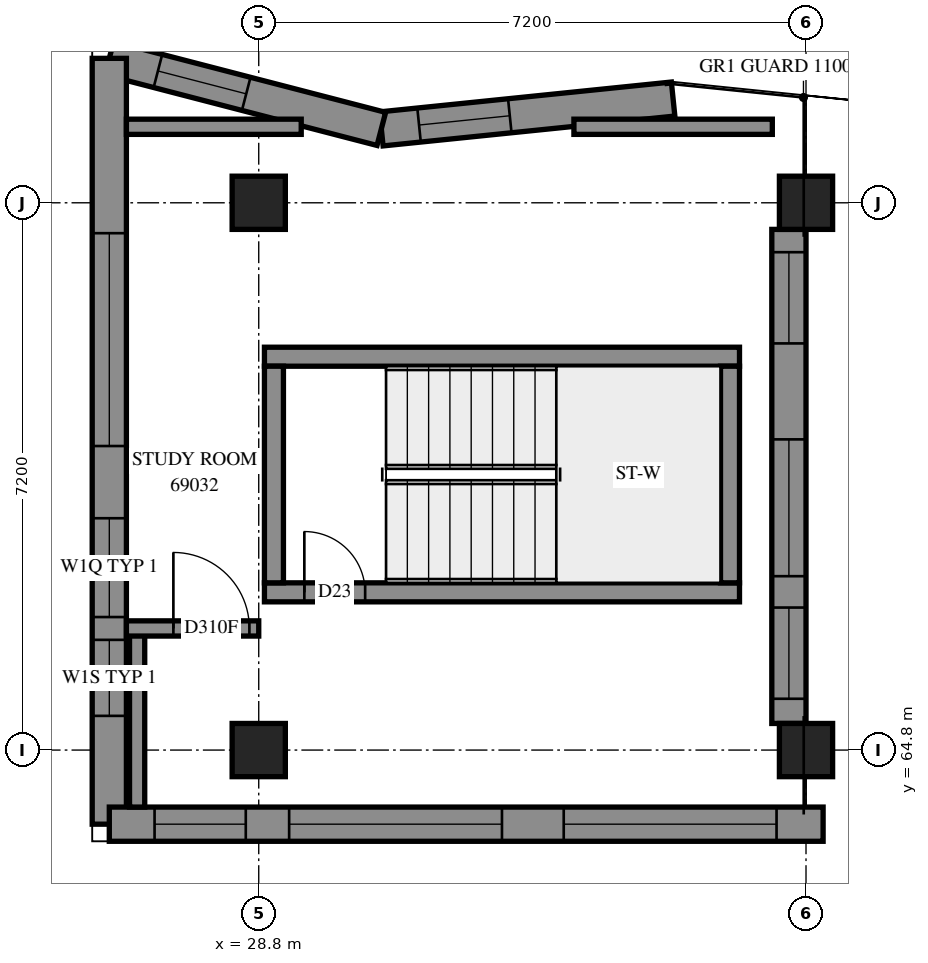
"""IFC4 building model, lengths in metres.
Left out: names, types, materials, properties, quantities, classifications, styles, units other than length and angle.
Written with IfcOpenShell. Run it as: python <this file> out.ifc"""

import sys

from ifc_helpers import new_model, si_unit, direction, frame, frame_2d, origin, origin_2d, place, context, subcontext, project, spatial, polyline, rectangle, outline, extrude, element, fill, save


model = new_model("IFC4")
c1 = context("Model", 3, precision=1e-05, world=origin(), true_north=direction((0.0, 1.0)))
c2 = subcontext(c1, "Body", "Model", "MODEL_VIEW")
j1 = project(units=[si_unit("LENGTHUNIT", "METRE"), si_unit("PLANEANGLEUNIT", "RADIAN")], contexts=[c1])
p1 = place(None, origin())
s1 = spatial("IfcSite", under=j1, at=p1, CompositionType="ELEMENT")
p2 = place(p1, origin())
s2 = spatial("IfcBuilding", under=s1, at=p2, CompositionType="ELEMENT")
p3 = place(p2, frame((0.0, 0.0, 254.0)))
s3 = spatial("IfcBuildingStorey", under=s2, at=p3, CompositionType="ELEMENT", Elevation=254.0)
for number, where, z_axis, x_axis in (
    (1, (28.8, 64.8, 0.0), (0.0, 0.0, 1.0), (1.0, 0.0, 0.0)),
    (2, (28.8, 72.0, 0.0), (0.0, 0.0, 1.0), (1.0, 0.0, 0.0)),
    (3, (36.0, 64.8, 0.0), (0.0, 0.0, 1.0), (1.0, 0.0, 0.0)),
    (4, (36.0, 72.0, 0.0), (0.0, 0.0, 1.0), (1.0, 0.0, 0.0)),
):
    element("IfcColumn", number, at=place(p3, frame(where, z_axis=z_axis, x_axis=x_axis)), inside=s3, PredefinedType="COLUMN", context=c2, shape_type="SweptSolid", body=[
        extrude(rectangle(XDim=0.7, YDim=0.7, at=origin_2d()), origin(), (0.0, 0.0, 1.0), 3.1),
    ])
p4 = place(p3, frame((34.252, 73.365, 0.0), z_axis=(0.0, 0.0, 1.0), x_axis=(-0.994808045, -0.1017691196, 0.0)))
e5 = element("IfcWall", 5, at=p4, inside=s3, PredefinedType="SOLIDWALL", context=c2, shape_type="SweptSolid", body=[
    extrude(outline(polyline([(-0.023, -0.225), (3.818, -0.225), (3.899, 0.225), (0.023, 0.225), (-0.023, -0.225)])), origin(), (0.0, 0.0, 1.0), 3.1),
])
p5 = place(p4, frame((2.16, 0.0, 0.45)))
e6 = element("IfcOpeningElement", 6, at=p5, cuts=e5, PredefinedType="OPENING", context=c2, shape_type="SweptSolid", body=[
    extrude(rectangle(XDim=1.2, YDim=2.55, at=frame_2d((0.6, 1.275))), frame((0.0, 0.235, 0.0), z_axis=(0.0, -1.0, 0.0), x_axis=(1.0, 0.0, 0.0)), (0.0, 0.0, 1.0), 0.47),
])
p6 = place(p3, frame((30.413, 72.972, 0.0), z_axis=(0.0, 0.0, 1.0), x_axis=(-0.967983026, 0.2510156598, 0.0)))
e7 = element("IfcWall", 7, at=p6, inside=s3, PredefinedType="SOLIDWALL", context=c2, shape_type="SweptSolid", body=[
    extrude(outline(polyline([(0.04, -0.225), (3.988, -0.225), (3.407, 0.225), (-0.04, 0.225), (0.04, -0.225)])), origin(), (0.0, 0.0, 1.0), 3.1),
])
p7 = place(p6, frame((1.837, 0.0, 0.45)))
e8 = element("IfcOpeningElement", 8, at=p7, cuts=e7, PredefinedType="OPENING", context=c2, shape_type="SweptSolid", body=[
    extrude(rectangle(XDim=1.2, YDim=2.55, at=frame_2d((0.6, 1.275))), frame((0.0, 0.235, 0.0), z_axis=(0.0, -1.0, 0.0), x_axis=(1.0, 0.0, 0.0)), (0.0, 0.0, 1.0), 0.47),
])
p8 = place(p3, frame((26.834, 73.9, 0.0), z_axis=(0.0, 0.0, 1.0), x_axis=(0.0, -1.0, 0.0)))
e9 = element("IfcWall", 9, at=p8, inside=s3, PredefinedType="SOLIDWALL", context=c2, shape_type="SweptSolid", body=[
    extrude(outline(polyline([(-0.291, -0.225), (10.3, -0.225), (9.85, 0.225), (0.291, 0.225), (-0.291, -0.225)])), origin(), (0.0, 0.0, 1.0), 3.1),
])
p9 = place(p8, frame((2.3, 0.0, 0.45)))
e10 = element("IfcOpeningElement", 10, at=p9, cuts=e9, PredefinedType="OPENING", context=c2, shape_type="SweptSolid", body=[
    extrude(rectangle(XDim=2.8, YDim=2.55, at=frame_2d((1.4, 1.275))), frame((0.0, 0.235, 0.0), z_axis=(0.0, -1.0, 0.0), x_axis=(1.0, 0.0, 0.0)), (0.0, 0.0, 1.0), 0.47),
])
p10 = place(p8, frame((6.05, 0.0, 0.45)))
e11 = element("IfcOpeningElement", 11, at=p10, cuts=e9, PredefinedType="OPENING", context=c2, shape_type="SweptSolid", body=[
    extrude(rectangle(XDim=1.3, YDim=2.5, at=frame_2d((0.65, 1.25))), frame((0.0, 0.235, 0.0), z_axis=(0.0, -1.0, 0.0), x_axis=(1.0, 0.0, 0.0)), (0.0, 0.0, 1.0), 0.47),
])
p11 = place(p8, frame((7.65, 0.0, 0.45)))
e12 = element("IfcOpeningElement", 12, at=p11, cuts=e9, PredefinedType="OPENING", context=c2, shape_type="SweptSolid", body=[
    extrude(rectangle(XDim=1.0, YDim=2.5, at=frame_2d((0.5, 1.25))), frame((0.0, 0.235, 0.0), z_axis=(0.0, -1.0, 0.0), x_axis=(1.0, 0.0, 0.0)), (0.0, 0.0, 1.0), 0.47),
])
p12 = place(p3, frame((26.834, 63.825, 0.0), z_axis=(0.0, 0.0, 1.0), x_axis=(1.0, 0.0, 0.0)))
e13 = element("IfcWall", 13, at=p12, inside=s3, PredefinedType="SOLIDWALL", context=c2, shape_type="SweptSolid", body=[
    extrude(outline(polyline([(-0.225, -0.225), (9.166, -0.225), (9.616, 0.225), (0.225, 0.225), (-0.225, -0.225)])), origin(), (0.0, 0.0, 1.0), 3.1),
])
p13 = place(p12, frame((2.366, 0.0, 0.45)))
e14 = element("IfcOpeningElement", 14, at=p13, cuts=e13, PredefinedType="OPENING", context=c2, shape_type="SweptSolid", body=[
    extrude(rectangle(XDim=2.8, YDim=2.55, at=frame_2d((1.4, 1.275))), frame((0.0, 0.235, 0.0), z_axis=(0.0, -1.0, 0.0), x_axis=(1.0, 0.0, 0.0)), (0.0, 0.0, 1.0), 0.47),
])
p14 = place(p12, frame((5.979, 0.0, 0.45)))
e15 = element("IfcOpeningElement", 15, at=p14, cuts=e13, PredefinedType="OPENING", context=c2, shape_type="SweptSolid", body=[
    extrude(rectangle(XDim=2.8, YDim=2.55, at=frame_2d((1.4, 1.275))), frame((0.0, 0.235, 0.0), z_axis=(0.0, -1.0, 0.0), x_axis=(1.0, 0.0, 0.0)), (0.0, 0.0, 1.0), 0.47),
])
p15 = place(p12, frame((0.596, 0.0, 0.45)))
e16 = element("IfcOpeningElement", 16, at=p15, cuts=e13, PredefinedType="OPENING", context=c2, shape_type="SweptSolid", body=[
    extrude(rectangle(XDim=1.2, YDim=2.55, at=frame_2d((0.6, 1.275))), frame((0.0, 0.235, 0.0), z_axis=(0.0, -1.0, 0.0), x_axis=(1.0, 0.0, 0.0)), (0.0, 0.0, 1.0), 0.47),
])
p16 = place(p3, frame((35.775, 65.15, 0.0), z_axis=(0.0, 0.0, 1.0), x_axis=(0.0, 1.0, 0.0)))
e17 = element("IfcWall", 17, at=p16, inside=s3, PredefinedType="SOLIDWALL", context=c2, shape_type="SweptSolid", body=[
    extrude(rectangle(XDim=6.5, YDim=0.45, at=frame_2d((3.25, 0.0))), origin(), (0.0, 0.0, 1.0), 3.1),
])
p17 = place(p16, frame((0.325, 0.0, 0.6)))
e18 = element("IfcOpeningElement", 18, at=p17, cuts=e17, PredefinedType="OPENING", context=c2, shape_type="SweptSolid", body=[
    extrude(rectangle(XDim=1.2, YDim=1.9, at=frame_2d((0.6, 0.95))), frame((0.0, 0.235, 0.0), z_axis=(0.0, -1.0, 0.0), x_axis=(1.0, 0.0, 0.0)), (0.0, 0.0, 1.0), 0.47),
])
p18 = place(p16, frame((1.938, 0.0, 0.7)))
e19 = element("IfcOpeningElement", 19, at=p18, cuts=e17, PredefinedType="OPENING", context=c2, shape_type="SweptSolid", body=[
    extrude(rectangle(XDim=1.8, YDim=1.8, at=frame_2d((0.9, 0.9))), frame((0.0, 0.235, 0.0), z_axis=(0.0, -1.0, 0.0), x_axis=(1.0, 0.0, 0.0)), (0.0, 0.0, 1.0), 0.47),
])
p19 = place(p16, frame((5.0, 0.0, 0.6)))
e20 = element("IfcOpeningElement", 20, at=p19, cuts=e17, PredefinedType="OPENING", context=c2, shape_type="SweptSolid", body=[
    extrude(rectangle(XDim=1.2, YDim=1.9, at=frame_2d((0.6, 0.95))), frame((0.0, 0.235, 0.0), z_axis=(0.0, -1.0, 0.0), x_axis=(1.0, 0.0, 0.0)), (0.0, 0.0, 1.0), 0.47),
])
p20 = place(p3, frame((28.875, 66.875, -0.3), z_axis=(0.0, 0.0, 1.0), x_axis=(1.0, 0.0, 0.0)))
e21 = element("IfcWall", 21, at=p20, inside=s3, PredefinedType="SOLIDWALL", context=c2, shape_type="SweptSolid", body=[
    extrude(rectangle(XDim=6.25, YDim=0.25, at=frame_2d((3.125, 0.0))), origin(), (0.0, 0.0, 1.0), 3.4),
])
p21 = place(p20, frame((0.525, 0.0, 0.3)))
e22 = element("IfcOpeningElement", 22, at=p21, cuts=e21, PredefinedType="OPENING", context=c2, shape_type="SweptSolid", body=[
    extrude(rectangle(XDim=0.8, YDim=2.1, at=frame_2d((0.4, 1.05))), frame((0.0, 0.135, 0.0), z_axis=(0.0, -1.0, 0.0), x_axis=(1.0, 0.0, 0.0)), (0.0, 0.0, 1.0), 0.27),
])
p22 = place(p3, frame((28.875, 69.975, -0.3), z_axis=(0.0, 0.0, 1.0), x_axis=(1.0, 0.0, 0.0)))
e23 = element("IfcWall", 23, at=p22, inside=s3, PredefinedType="SOLIDWALL", context=c2, shape_type="SweptSolid", body=[
    extrude(rectangle(XDim=6.25, YDim=0.25, at=frame_2d((3.125, 0.0))), origin(), (0.0, 0.0, 1.0), 3.4),
])
for number, where, z_axis, x_axis in (
    (24, (29.0, 67.0, -0.3), (0.0, 0.0, 1.0), (0.0, 1.0, 0.0)),
    (25, (35.0, 67.0, -0.3), (0.0, 0.0, 1.0), (0.0, 1.0, 0.0)),
):
    element("IfcWall", number, at=place(p3, frame(where, z_axis=z_axis, x_axis=x_axis)), inside=s3, PredefinedType="SOLIDWALL", context=c2, shape_type="SweptSolid", body=[
        extrude(rectangle(XDim=2.85, YDim=0.25, at=frame_2d((1.425, 0.0))), origin(), (0.0, 0.0, 1.0), 3.4),
    ])
p23 = place(p3, frame((32.947, 73.0, 0.0), z_axis=(0.0, 0.0, 1.0), x_axis=(1.0, 0.0, 0.0)))
e26 = element("IfcWall", 26, at=p23, inside=s3, PredefinedType="PARTITIONING", context=c2, shape_type="SweptSolid", body=[
    extrude(rectangle(XDim=2.61, YDim=0.2, at=frame_2d((1.305, 0.0))), origin(), (0.0, 0.0, 1.0), 3.1),
])
p24 = place(p3, frame((27.2, 64.05, 0.0), z_axis=(0.0, 0.0, 1.0), x_axis=(0.0, 1.0, 0.0)))
e27 = element("IfcWall", 27, at=p24, inside=s3, PredefinedType="PARTITIONING", context=c2, shape_type="SweptSolid", body=[
    extrude(rectangle(XDim=2.348, YDim=0.2, at=frame_2d((1.174, 0.0))), origin(), (0.0, 0.0, 1.0), 3.1),
])
p25 = place(p3, frame((27.059, 73.0, 0.0), z_axis=(0.0, 0.0, 1.0), x_axis=(1.0, 0.0, 0.0)))
e28 = element("IfcWall", 28, at=p25, inside=s3, PredefinedType="PARTITIONING", context=c2, shape_type="SweptSolid", body=[
    extrude(rectangle(XDim=2.3, YDim=0.2, at=frame_2d((1.15, 0.0))), origin(), (0.0, 0.0, 1.0), 3.1),
])
p26 = place(p3, frame((27.059, 66.4, 0.0), z_axis=(0.0, 0.0, 1.0), x_axis=(1.0, 0.0, 0.0)))
e29 = element("IfcWall", 29, at=p26, inside=s3, PredefinedType="PARTITIONING", context=c2, shape_type="SweptSolid", body=[
    extrude(rectangle(XDim=1.741, YDim=0.2, at=frame_2d((0.871, 0.0))), origin(), (0.0, 0.0, 1.0), 3.1),
])
p27 = place(p26, frame((0.618, 0.0, 0.0)))
e30 = element("IfcOpeningElement", 30, at=p27, cuts=e29, PredefinedType="OPENING", context=c2, shape_type="SweptSolid", body=[
    extrude(rectangle(XDim=1.0, YDim=2.1, at=frame_2d((0.5, 1.05))), frame((0.0, 0.11, 0.0), z_axis=(0.0, -1.0, 0.0), x_axis=(1.0, 0.0, 0.0)), (0.0, 0.0, 1.0), 0.22),
])
p28 = place(p5, origin())
e31 = element("IfcWindow", 31, at=p28, inside=s3, PartitioningType="SINGLE_PANEL", PredefinedType="WINDOW", context=c2, shape_type="SweptSolid", body=[
    extrude(rectangle(XDim=1.2, YDim=2.55, at=frame_2d((0.6, 1.275))), frame((0.0, 0.205, 0.0), z_axis=(0.0, -1.0, 0.0), x_axis=(1.0, 0.0, 0.0)), (0.0, 0.0, 1.0), 0.06),
])
fill(e6, e31)
p29 = place(p7, origin())
e32 = element("IfcWindow", 32, at=p29, inside=s3, PartitioningType="SINGLE_PANEL", PredefinedType="WINDOW", context=c2, shape_type="SweptSolid", body=[
    extrude(rectangle(XDim=1.2, YDim=2.55, at=frame_2d((0.6, 1.275))), frame((0.0, 0.205, 0.0), z_axis=(0.0, -1.0, 0.0), x_axis=(1.0, 0.0, 0.0)), (0.0, 0.0, 1.0), 0.06),
])
fill(e8, e32)
p30 = place(p9, origin())
e33 = element("IfcWindow", 33, at=p30, inside=s3, PartitioningType="SINGLE_PANEL", PredefinedType="WINDOW", context=c2, shape_type="SweptSolid", body=[
    extrude(rectangle(XDim=2.8, YDim=2.55, at=frame_2d((1.4, 1.275))), frame((0.0, 0.205, 0.0), z_axis=(0.0, -1.0, 0.0), x_axis=(1.0, 0.0, 0.0)), (0.0, 0.0, 1.0), 0.06),
])
fill(e10, e33)
p31 = place(p13, origin())
e34 = element("IfcWindow", 34, at=p31, inside=s3, PartitioningType="SINGLE_PANEL", PredefinedType="WINDOW", context=c2, shape_type="SweptSolid", body=[
    extrude(rectangle(XDim=2.8, YDim=2.55, at=frame_2d((1.4, 1.275))), frame((0.0, 0.205, 0.0), z_axis=(0.0, -1.0, 0.0), x_axis=(1.0, 0.0, 0.0)), (0.0, 0.0, 1.0), 0.06),
])
fill(e14, e34)
p32 = place(p14, origin())
e35 = element("IfcWindow", 35, at=p32, inside=s3, PartitioningType="SINGLE_PANEL", PredefinedType="WINDOW", context=c2, shape_type="SweptSolid", body=[
    extrude(rectangle(XDim=2.8, YDim=2.55, at=frame_2d((1.4, 1.275))), frame((0.0, 0.205, 0.0), z_axis=(0.0, -1.0, 0.0), x_axis=(1.0, 0.0, 0.0)), (0.0, 0.0, 1.0), 0.06),
])
fill(e15, e35)
p33 = place(p15, origin())
e36 = element("IfcWindow", 36, at=p33, inside=s3, PartitioningType="SINGLE_PANEL", PredefinedType="WINDOW", context=c2, shape_type="SweptSolid", body=[
    extrude(rectangle(XDim=1.2, YDim=2.55, at=frame_2d((0.6, 1.275))), frame((0.0, 0.205, 0.0), z_axis=(0.0, -1.0, 0.0), x_axis=(1.0, 0.0, 0.0)), (0.0, 0.0, 1.0), 0.06),
])
fill(e16, e36)
p34 = place(p21, origin())
e37 = element("IfcDoor", 37, at=p34, inside=s3, OperationType="SINGLE_SWING_LEFT", PredefinedType="DOOR", context=c2, shape_type="SweptSolid", body=[
    extrude(rectangle(XDim=0.8, YDim=2.1, at=frame_2d((0.4, 1.05))), frame((0.0, 0.025, 0.0), z_axis=(0.0, -1.0, 0.0), x_axis=(1.0, 0.0, 0.0)), (0.0, 0.0, 1.0), 0.05),
])
fill(e22, e37)
p35 = place(p27, origin())
e38 = element("IfcDoor", 38, at=p35, inside=s3, OperationType="SINGLE_SWING_RIGHT", PredefinedType="DOOR", context=c2, shape_type="SweptSolid", body=[
    extrude(rectangle(XDim=1.0, YDim=2.1, at=frame_2d((0.5, 1.05))), frame((0.0, 0.025, 0.0), z_axis=(0.0, -1.0, 0.0), x_axis=(1.0, 0.0, 0.0)), (0.0, 0.0, 1.0), 0.05),
])
fill(e30, e38)
p36 = place(p10, origin())
e39 = element("IfcWindow", 39, at=p36, inside=s3, PartitioningType="SINGLE_PANEL", PredefinedType="WINDOW", context=c2, shape_type="SweptSolid", body=[
    extrude(rectangle(XDim=1.3, YDim=2.5, at=frame_2d((0.65, 1.25))), frame((0.0, 0.205, 0.0), z_axis=(0.0, -1.0, 0.0), x_axis=(1.0, 0.0, 0.0)), (0.0, 0.0, 1.0), 0.06),
])
fill(e11, e39)
p37 = place(p11, origin())
e40 = element("IfcWindow", 40, at=p37, inside=s3, PartitioningType="SINGLE_PANEL", PredefinedType="WINDOW", context=c2, shape_type="SweptSolid", body=[
    extrude(rectangle(XDim=1.0, YDim=2.5, at=frame_2d((0.5, 1.25))), frame((0.0, 0.205, 0.0), z_axis=(0.0, -1.0, 0.0), x_axis=(1.0, 0.0, 0.0)), (0.0, 0.0, 1.0), 0.06),
])
fill(e12, e40)
p38 = place(p17, origin())
e41 = element("IfcWindow", 41, at=p38, inside=s3, PartitioningType="SINGLE_PANEL", PredefinedType="WINDOW", context=c2, shape_type="SweptSolid", body=[
    extrude(rectangle(XDim=1.2, YDim=1.9, at=frame_2d((0.6, 0.95))), frame((0.0, 0.205, 0.0), z_axis=(0.0, -1.0, 0.0), x_axis=(1.0, 0.0, 0.0)), (0.0, 0.0, 1.0), 0.06),
])
fill(e18, e41)
p39 = place(p18, origin())
e42 = element("IfcWindow", 42, at=p39, inside=s3, PartitioningType="SINGLE_PANEL", PredefinedType="WINDOW", context=c2, shape_type="SweptSolid", body=[
    extrude(rectangle(XDim=1.8, YDim=1.8, at=frame_2d((0.9, 0.9))), frame((0.0, 0.205, 0.0), z_axis=(0.0, -1.0, 0.0), x_axis=(1.0, 0.0, 0.0)), (0.0, 0.0, 1.0), 0.06),
])
fill(e19, e42)
p40 = place(p19, origin())
e43 = element("IfcWindow", 43, at=p40, inside=s3, PartitioningType="SINGLE_PANEL", PredefinedType="WINDOW", context=c2, shape_type="SweptSolid", body=[
    extrude(rectangle(XDim=1.2, YDim=1.9, at=frame_2d((0.6, 0.95))), frame((0.0, 0.205, 0.0), z_axis=(0.0, -1.0, 0.0), x_axis=(1.0, 0.0, 0.0)), (0.0, 0.0, 1.0), 0.06),
])
fill(e20, e43)
save(model, sys.argv[1])
